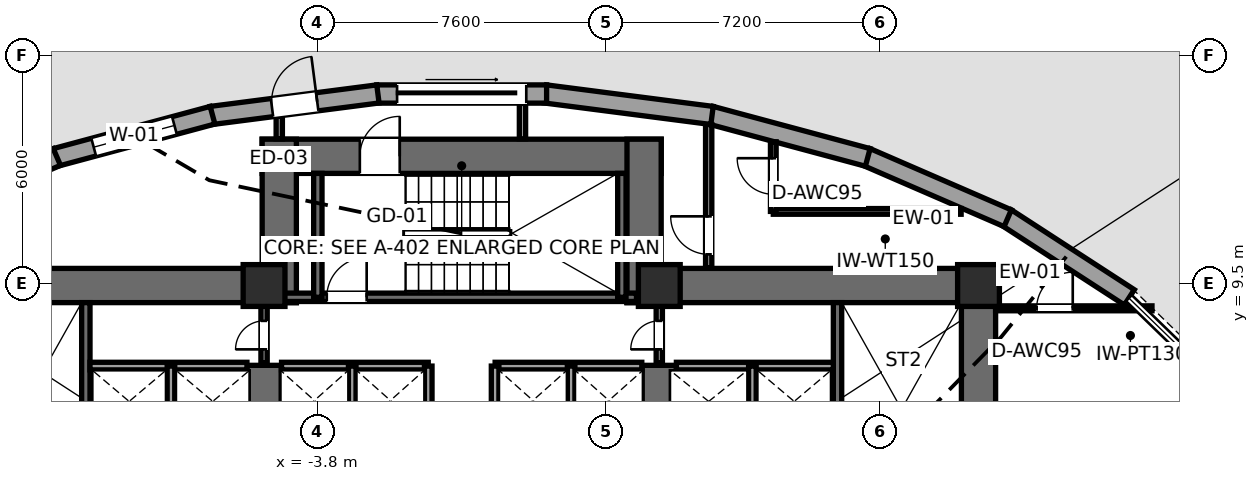
"""IFC4 building model, lengths in metres.
Left out: names, types, materials, properties, quantities, classifications, styles, units other than length and angle.
Written with IfcOpenShell. Run it as: python <this file> out.ifc"""

import sys

from ifc_helpers import new_model, si_unit, direction, frame, frame_2d, origin, origin_2d, place, context, subcontext, project, spatial, rectangle, extrude, element, fill, save


model = new_model("IFC4")
c1 = context("Model", 3, precision=1e-05, world=origin(), true_north=direction((0.0, 1.0)))
c2 = subcontext(c1, "Body", "Model", "MODEL_VIEW")
j1 = project(units=[si_unit("LENGTHUNIT", "METRE"), si_unit("PLANEANGLEUNIT", "RADIAN")], contexts=[c1])
p1 = place(None, origin())
s1 = spatial("IfcSite", under=j1, at=p1, CompositionType="ELEMENT")
p2 = place(p1, origin())
s2 = spatial("IfcBuilding", under=s1, at=p2, CompositionType="ELEMENT")
p3 = place(p2, origin())
s3 = spatial("IfcBuildingStorey", under=s2, at=p3, CompositionType="ELEMENT", Elevation=0.0)
p4 = place(p3, frame((-14.05, 9.45, 0.0), z_axis=(0.0, 0.0, 1.0), x_axis=(1.0, 0.0, 0.0)))
e1 = element("IfcWall", 1, at=p4, inside=s3, PredefinedType="SHEAR", context=c2, shape_type="SweptSolid", body=[
    extrude(rectangle(XDim=9.7, YDim=0.9, at=frame_2d((4.85, 0.0))), origin(), (0.0, 0.0, 1.0), 6.0),
])
p5 = place(p3, frame((-5.2, 5.35, 0.0), z_axis=(0.0, 0.0, 1.0), x_axis=(0.0, 1.0, 0.0)))
e2 = element("IfcWall", 2, at=p5, inside=s3, PredefinedType="SHEAR", context=c2, shape_type="SweptSolid", body=[
    extrude(rectangle(XDim=2.0, YDim=0.9, at=frame_2d((1.0, 0.0))), origin(), (0.0, 0.0, 1.0), 6.0),
])
p6 = place(p3, frame((-9.89, 1.85, 0.0), z_axis=(0.0, 0.0, 1.0), x_axis=(0.0, 1.0, 0.0)))
e3 = element("IfcWall", 3, at=p6, inside=s3, PredefinedType="SHEAR", context=c2, shape_type="SweptSolid", body=[
    extrude(rectangle(XDim=7.15, YDim=0.22, at=frame_2d((3.575, 0.0))), origin(), (0.0, 0.0, 1.0), 6.0),
])
p7 = place(p3, frame((13.6, 0.95, 0.0), z_axis=(0.0, 0.0, 1.0), x_axis=(0.0, 1.0, 0.0)))
e4 = element("IfcWall", 4, at=p7, inside=s3, PredefinedType="SHEAR", context=c2, shape_type="SweptSolid", body=[
    extrude(rectangle(XDim=8.95, YDim=0.9, at=frame_2d((4.475, 0.0))), origin(), (0.0, 0.0, 1.0), 6.0),
])
p8 = place(p7, frame((1.27, 0.0, 0.0)))
e5 = element("IfcOpeningElement", 5, at=p8, cuts=e4, PredefinedType="OPENING", context=c2, shape_type="SweptSolid", body=[
    extrude(rectangle(XDim=1.05, YDim=2.15, at=frame_2d((0.525, 1.075))), frame((0.0, 0.46, 0.0), z_axis=(0.0, -1.0, 0.0), x_axis=(1.0, 0.0, 0.0)), (0.0, 0.0, 1.0), 0.92),
])
p9 = place(p3, frame((4.35, 9.45, 0.0), z_axis=(0.0, 0.0, 1.0), x_axis=(1.0, 0.0, 0.0)))
e6 = element("IfcWall", 6, at=p9, inside=s3, PredefinedType="SHEAR", context=c2, shape_type="SweptSolid", body=[
    extrude(rectangle(XDim=9.7, YDim=0.9, at=frame_2d((4.85, 0.0))), origin(), (0.0, 0.0, 1.0), 6.0),
])
p10 = place(p3, frame((5.2, 5.35, 0.0), z_axis=(0.0, 0.0, 1.0), x_axis=(0.0, 1.0, 0.0)))
e7 = element("IfcWall", 7, at=p10, inside=s3, PredefinedType="SHEAR", context=c2, shape_type="SweptSolid", body=[
    extrude(rectangle(XDim=2.0, YDim=0.9, at=frame_2d((1.0, 0.0))), origin(), (0.0, 0.0, 1.0), 6.0),
])
p11 = place(p3, frame((9.89, 1.85, 0.0), z_axis=(0.0, 0.0, 1.0), x_axis=(0.0, 1.0, 0.0)))
e8 = element("IfcWall", 8, at=p11, inside=s3, PredefinedType="SHEAR", context=c2, shape_type="SweptSolid", body=[
    extrude(rectangle(XDim=7.15, YDim=0.22, at=frame_2d((3.575, 0.0))), origin(), (0.0, 0.0, 1.0), 6.0),
])
p12 = place(p3, frame((-5.25, 12.85, 0.0), z_axis=(0.0, 0.0, 1.0), x_axis=(1.0, 0.0, 0.0)))
e9 = element("IfcWall", 9, at=p12, inside=s3, PredefinedType="SHEAR", context=c2, shape_type="SweptSolid", body=[
    extrude(rectangle(XDim=10.5, YDim=0.9, at=frame_2d((5.25, 0.0))), origin(), (0.0, 0.0, 1.0), 6.0),
])
p13 = place(p12, frame((2.57, 0.0, 0.0)))
e10 = element("IfcOpeningElement", 10, at=p13, cuts=e9, PredefinedType="OPENING", context=c2, shape_type="SweptSolid", body=[
    extrude(rectangle(XDim=1.05, YDim=2.15, at=frame_2d((0.525, 1.075))), frame((0.0, 0.46, 0.0), z_axis=(0.0, -1.0, 0.0), x_axis=(1.0, 0.0, 0.0)), (0.0, 0.0, 1.0), 0.92),
])
for number, where, z_axis, x_axis in (
    (11, (-4.8, 9.0, 0.0), (0.0, 0.0, 1.0), (0.0, 1.0, 0.0)),
    (12, (4.8, 9.0, 0.0), (0.0, 0.0, 1.0), (0.0, 1.0, 0.0)),
):
    element("IfcWall", number, at=place(p3, frame(where, z_axis=z_axis, x_axis=x_axis)), inside=s3, PredefinedType="SHEAR", context=c2, shape_type="SweptSolid", body=[
        extrude(rectangle(XDim=4.3, YDim=0.9, at=frame_2d((2.15, 0.0))), origin(), (0.0, 0.0, 1.0), 6.0),
    ])
p14 = place(p3, frame((-4.7, 9.14, 0.0), z_axis=(0.0, 0.0, 1.0), x_axis=(1.0, 0.0, 0.0)))
e13 = element("IfcWall", 13, at=p14, inside=s3, PredefinedType="SHEAR", context=c2, shape_type="SweptSolid", body=[
    extrude(rectangle(XDim=9.3, YDim=0.22, at=frame_2d((4.65, 0.0))), origin(), (0.0, 0.0, 1.0), 6.0),
])
p15 = place(p14, frame((1.15, 0.0, 0.0)))
e14 = element("IfcOpeningElement", 14, at=p15, cuts=e13, PredefinedType="OPENING", context=c2, shape_type="SweptSolid", body=[
    extrude(rectangle(XDim=1.05, YDim=2.15, at=frame_2d((0.525, 1.075))), frame((0.0, 0.12, 0.0), z_axis=(0.0, -1.0, 0.0), x_axis=(1.0, 0.0, 0.0)), (0.0, 0.0, 1.0), 0.24),
])
for number, where, z_axis, x_axis in (
    (15, (-3.785, 9.14, 0.0), (0.0, 0.0, 1.0), (0.0, 1.0, 0.0)),
    (16, (4.215, 9.14, 0.0), (0.0, 0.0, 1.0), (0.0, 1.0, 0.0)),
):
    element("IfcWall", number, at=place(p3, frame(where, z_axis=z_axis, x_axis=x_axis)), inside=s3, PredefinedType="SHEAR", context=c2, shape_type="SweptSolid", body=[
        extrude(rectangle(XDim=3.26, YDim=0.22, at=frame_2d((1.63, 0.0))), origin(), (0.0, 0.0, 1.0), 6.0),
    ])
for number, where, z_axis, x_axis in (
    (17, (-5.2, 9.45, 0.0), (0.0, 0.0, 1.0), (1.0, 0.0, 0.0)),
    (18, (5.2, 9.45, 0.0), (0.0, 0.0, 1.0), (1.0, 0.0, 0.0)),
    (19, (13.6, 9.45, 0.0), (0.0, 0.0, 1.0), (1.0, 0.0, 0.0)),
):
    element("IfcColumn", number, at=place(p3, frame(where, z_axis=z_axis, x_axis=x_axis)), inside=s3, PredefinedType="COLUMN", context=c2, shape_type="SweptSolid", body=[
        extrude(rectangle(XDim=1.1, YDim=1.1, at=origin_2d()), origin(), (0.0, 0.0, 1.0), 6.0),
    ])
p16 = place(p3, frame((14.333, 11.239, 0.0), z_axis=(0.0, 0.0, 1.0), x_axis=(0.838764450243, -0.54449444167, 0.0)))
e20 = element("IfcWall", 20, at=p16, inside=s3, PredefinedType="STANDARD", context=c2, shape_type="SweptSolid", body=[
    extrude(rectangle(XDim=3.858, YDim=0.48, at=frame_2d((1.929, 0.0))), origin(), (0.0, 0.0, 1.0), 4.913),
])
p17 = place(p3, frame((10.652, 12.832, 0.0), z_axis=(0.0, 0.0, 1.0), x_axis=(0.917428047281, -0.3979017191, 0.0)))
e21 = element("IfcWall", 21, at=p17, inside=s3, PredefinedType="STANDARD", context=c2, shape_type="SweptSolid", body=[
    extrude(rectangle(XDim=4.051, YDim=0.48, at=frame_2d((2.025, 0.0))), origin(), (0.0, 0.0, 1.0), 4.913),
])
p18 = place(p3, frame((6.556, 13.931, 0.0), z_axis=(0.0, 0.0, 1.0), x_axis=(0.965698398437, -0.259666330619, 0.0)))
e22 = element("IfcWall", 22, at=p18, inside=s3, PredefinedType="STANDARD", context=c2, shape_type="SweptSolid", body=[
    extrude(rectangle(XDim=4.276, YDim=0.48, at=frame_2d((2.138, 0.0))), origin(), (0.0, 0.0, 1.0), 4.913),
])
p19 = place(p3, frame((2.204, 14.491, 0.0), z_axis=(0.0, 0.0, 1.0), x_axis=(0.99177017627, -0.128030923847, 0.0)))
e23 = element("IfcWall", 23, at=p19, inside=s3, PredefinedType="STANDARD", context=c2, shape_type="SweptSolid", body=[
    extrude(rectangle(XDim=4.42, YDim=0.48, at=frame_2d((2.21, 0.0))), origin(), (0.0, 0.0, 1.0), 4.913),
])
p20 = place(p3, frame((-2.235, 14.489, 0.0), z_axis=(0.0, 0.0, 1.0), x_axis=(1.0, 0.0, 0.0)))
e24 = element("IfcWall", 24, at=p20, inside=s3, PredefinedType="STANDARD", context=c2, shape_type="SweptSolid", body=[
    extrude(rectangle(XDim=4.47, YDim=0.48, at=frame_2d((2.235, 0.0))), origin(), (0.0, 0.0, 1.0), 4.913),
])
p21 = place(p20, frame((0.535, 0.0, 0.0)))
e25 = element("IfcOpeningElement", 25, at=p21, cuts=e24, PredefinedType="OPENING", context=c2, shape_type="SweptSolid", body=[
    extrude(rectangle(XDim=3.4, YDim=3.6, at=frame_2d((1.7, 1.8))), frame((0.0, 0.25, 0.0), z_axis=(0.0, -1.0, 0.0), x_axis=(1.0, 0.0, 0.0)), (0.0, 0.0, 1.0), 0.5),
])
p22 = place(p3, frame((-6.588, 13.925, 0.0), z_axis=(0.0, 0.0, 1.0), x_axis=(0.99177017627, 0.128030923847, 0.0)))
e26 = element("IfcWall", 26, at=p22, inside=s3, PredefinedType="STANDARD", context=c2, shape_type="SweptSolid", body=[
    extrude(rectangle(XDim=4.42, YDim=0.48, at=frame_2d((2.21, 0.0))), origin(), (0.0, 0.0, 1.0), 4.913),
])
p23 = place(p22, frame((1.61, 0.0, 0.0)))
e27 = element("IfcOpeningElement", 27, at=p23, cuts=e26, PredefinedType="OPENING", context=c2, shape_type="SweptSolid", body=[
    extrude(rectangle(XDim=1.2, YDim=2.2, at=frame_2d((0.6, 1.1))), frame((0.0, 0.25, 0.0), z_axis=(0.0, -1.0, 0.0), x_axis=(1.0, 0.0, 0.0)), (0.0, 0.0, 1.0), 0.5),
])
p24 = place(p3, frame((-10.686, 12.821, 0.0), z_axis=(0.0, 0.0, 1.0), x_axis=(0.965698398437, 0.259666330619, 0.0)))
e28 = element("IfcWall", 28, at=p24, inside=s3, PredefinedType="STANDARD", context=c2, shape_type="SweptSolid", body=[
    extrude(rectangle(XDim=4.276, YDim=0.48, at=frame_2d((2.138, 0.0))), origin(), (0.0, 0.0, 1.0), 4.913),
])
p25 = place(p24, frame((1.038, 0.0, 0.85)))
e29 = element("IfcOpeningElement", 29, at=p25, cuts=e28, PredefinedType="OPENING", context=c2, shape_type="SweptSolid", body=[
    extrude(rectangle(XDim=2.2, YDim=1.95, at=frame_2d((1.1, 0.975))), frame((0.0, 0.25, 0.0), z_axis=(0.0, -1.0, 0.0), x_axis=(1.0, 0.0, 0.0)), (0.0, 0.0, 1.0), 0.5),
])
p26 = place(p3, frame((-14.369, 11.22, 0.0), z_axis=(0.0, 0.0, 1.0), x_axis=(0.917428047281, 0.3979017191, 0.0)))
e30 = element("IfcWall", 30, at=p26, inside=s3, PredefinedType="STANDARD", context=c2, shape_type="SweptSolid", body=[
    extrude(rectangle(XDim=4.051, YDim=0.48, at=frame_2d((2.025, 0.0))), origin(), (0.0, 0.0, 1.0), 4.913),
])
p27 = place(p26, frame((0.925, 0.0, 0.85)))
e31 = element("IfcOpeningElement", 31, at=p27, cuts=e30, PredefinedType="OPENING", context=c2, shape_type="SweptSolid", body=[
    extrude(rectangle(XDim=2.2, YDim=1.95, at=frame_2d((1.1, 0.975))), frame((0.0, 0.25, 0.0), z_axis=(0.0, -1.0, 0.0), x_axis=(1.0, 0.0, 0.0)), (0.0, 0.0, 1.0), 0.5),
])
p28 = place(p3, frame((-9.78, 7.33, 0.0), z_axis=(0.0, 0.0, 1.0), x_axis=(1.0, 0.0, 0.0)))
e32 = element("IfcWall", 32, at=p28, inside=s3, PredefinedType="SOLIDWALL", context=c2, shape_type="SweptSolid", body=[
    extrude(rectangle(XDim=4.13, YDim=0.2, at=frame_2d((2.065, 0.0))), origin(), (0.0, 0.0, 1.0), 5.78),
])
p29 = place(p3, frame((-7.65, 5.47, 0.0), z_axis=(0.0, 0.0, 1.0), x_axis=(0.0, 1.0, 0.0)))
e33 = element("IfcWall", 33, at=p29, inside=s3, PredefinedType="SOLIDWALL", context=c2, shape_type="SweptSolid", body=[
    extrude(rectangle(XDim=1.86, YDim=0.2, at=frame_2d((0.93, 0.0))), origin(), (0.0, 0.0, 1.0), 5.78),
])
p30 = place(p3, frame((5.65, 7.33, 0.0), z_axis=(0.0, 0.0, 1.0), x_axis=(1.0, 0.0, 0.0)))
e34 = element("IfcWall", 34, at=p30, inside=s3, PredefinedType="SOLIDWALL", context=c2, shape_type="SweptSolid", body=[
    extrude(rectangle(XDim=4.13, YDim=0.2, at=frame_2d((2.065, 0.0))), origin(), (0.0, 0.0, 1.0), 5.78),
])
p31 = place(p3, frame((7.65, 5.47, 0.0), z_axis=(0.0, 0.0, 1.0), x_axis=(0.0, 1.0, 0.0)))
e35 = element("IfcWall", 35, at=p31, inside=s3, PredefinedType="SOLIDWALL", context=c2, shape_type="SweptSolid", body=[
    extrude(rectangle(XDim=1.86, YDim=0.2, at=frame_2d((0.93, 0.0))), origin(), (0.0, 0.0, 1.0), 5.78),
])
for number, where, z_axis, x_axis in (
    (36, (-4.74, 7.33, 0.0), (0.0, 0.0, 1.0), (1.0, 0.0, 0.0)),
    (37, (0.88, 7.33, 0.0), (0.0, 0.0, 1.0), (1.0, 0.0, 0.0)),
):
    element("IfcWall", number, at=place(p3, frame(where, z_axis=z_axis, x_axis=x_axis)), inside=s3, PredefinedType="SOLIDWALL", context=c2, shape_type="SweptSolid", body=[
        extrude(rectangle(XDim=3.86, YDim=0.2, at=frame_2d((1.93, 0.0))), origin(), (0.0, 0.0, 1.0), 5.78),
    ])
for number, where, z_axis, x_axis in (
    (38, (-2.88, 5.52, 0.0), (0.0, 0.0, 1.0), (0.0, 1.0, 0.0)),
    (39, (2.88, 5.52, 0.0), (0.0, 0.0, 1.0), (0.0, 1.0, 0.0)),
    (40, (-0.88, 5.52, 0.0), (0.0, 0.0, 1.0), (0.0, 1.0, 0.0)),
    (41, (0.88, 5.52, 0.0), (0.0, 0.0, 1.0), (0.0, 1.0, 0.0)),
):
    element("IfcWall", number, at=place(p3, frame(where, z_axis=z_axis, x_axis=x_axis)), inside=s3, PredefinedType="SOLIDWALL", context=c2, shape_type="SweptSolid", body=[
        extrude(rectangle(XDim=1.81, YDim=0.2, at=frame_2d((0.905, 0.0))), origin(), (0.0, 0.0, 1.0), 5.78),
    ])
p32 = place(p3, frame((-5.2, 7.42, 0.0), z_axis=(0.0, 0.0, 1.0), x_axis=(0.0, 1.0, 0.0)))
e42 = element("IfcWall", 42, at=p32, inside=s3, PredefinedType="PARTITIONING", context=c2, shape_type="SweptSolid", body=[
    extrude(rectangle(XDim=1.58, YDim=0.165, at=frame_2d((0.79, 0.0))), origin(), (0.0, 0.0, 1.0), 5.78),
])
p33 = place(p32, frame((0.35, 0.0, 0.0)))
e43 = element("IfcOpeningElement", 43, at=p33, cuts=e42, PredefinedType="OPENING", context=c2, shape_type="SweptSolid", body=[
    extrude(rectangle(XDim=0.75, YDim=2.1, at=frame_2d((0.375, 1.05))), frame((0.0, 0.093, 0.0), z_axis=(0.0, -1.0, 0.0), x_axis=(1.0, 0.0, 0.0)), (0.0, 0.0, 1.0), 0.185),
])
p34 = place(p3, frame((5.2, 7.42, 0.0), z_axis=(0.0, 0.0, 1.0), x_axis=(0.0, 1.0, 0.0)))
e44 = element("IfcWall", 44, at=p34, inside=s3, PredefinedType="PARTITIONING", context=c2, shape_type="SweptSolid", body=[
    extrude(rectangle(XDim=1.58, YDim=0.165, at=frame_2d((0.79, 0.0))), origin(), (0.0, 0.0, 1.0), 5.78),
])
p35 = place(p34, frame((0.35, 0.0, 0.0)))
e45 = element("IfcOpeningElement", 45, at=p35, cuts=e44, PredefinedType="OPENING", context=c2, shape_type="SweptSolid", body=[
    extrude(rectangle(XDim=0.75, YDim=2.1, at=frame_2d((0.375, 1.05))), frame((0.0, 0.093, 0.0), z_axis=(0.0, -1.0, 0.0), x_axis=(1.0, 0.0, 0.0)), (0.0, 0.0, 1.0), 0.185),
])
p36 = place(p3, frame((-4.8, 13.31, 0.0), z_axis=(0.0, 0.0, 1.0), x_axis=(0.0, 1.0, 0.0)))
e46 = element("IfcWall", 46, at=p36, inside=s3, PredefinedType="PARTITIONING", context=c2, shape_type="SweptSolid", body=[
    extrude(rectangle(XDim=0.595, YDim=0.165, at=frame_2d((0.298, 0.0))), origin(), (0.0, 0.0, 1.0), 5.233),
])
p37 = place(p3, frame((1.6, 13.31, 0.0), z_axis=(0.0, 0.0, 1.0), x_axis=(0.0, 1.0, 0.0)))
e47 = element("IfcWall", 47, at=p37, inside=s3, PredefinedType="PARTITIONING", context=c2, shape_type="SweptSolid", body=[
    extrude(rectangle(XDim=0.931, YDim=0.165, at=frame_2d((0.465, 0.0))), origin(), (0.0, 0.0, 1.0), 5.78),
])
p38 = place(p3, frame((6.5, 9.92, 0.0), z_axis=(0.0, 0.0, 1.0), x_axis=(0.0, 1.0, 0.0)))
e48 = element("IfcWall", 48, at=p38, inside=s3, PredefinedType="PARTITIONING", context=c2, shape_type="SweptSolid", body=[
    extrude(rectangle(XDim=3.766, YDim=0.165, at=frame_2d((1.883, 0.0))), origin(), (0.0, 0.0, 1.0), 5.148),
])
p39 = place(p38, frame((0.35, 0.0, 0.0)))
e49 = element("IfcOpeningElement", 49, at=p39, cuts=e48, PredefinedType="OPENING", context=c2, shape_type="SweptSolid", body=[
    extrude(rectangle(XDim=1.0, YDim=2.15, at=frame_2d((0.5, 1.075))), frame((0.0, 0.093, 0.0), z_axis=(0.0, -1.0, 0.0), x_axis=(1.0, 0.0, 0.0)), (0.0, 0.0, 1.0), 0.185),
])
p40 = place(p3, frame((8.2, 11.4, 0.0), z_axis=(0.0, 0.0, 1.0), x_axis=(1.0, 0.0, 0.0)))
e50 = element("IfcWall", 50, at=p40, inside=s3, PredefinedType="PLUMBINGWALL", context=c2, shape_type="SweptSolid", body=[
    extrude(rectangle(XDim=4.943, YDim=0.15, at=frame_2d((2.471, 0.0))), origin(), (0.0, 0.0, 1.0), 5.78),
])
p41 = place(p3, frame((8.2, 11.4, 0.0), z_axis=(0.0, 0.0, 1.0), x_axis=(0.0, 1.0, 0.0)))
e51 = element("IfcWall", 51, at=p41, inside=s3, PredefinedType="PLUMBINGWALL", context=c2, shape_type="SweptSolid", body=[
    extrude(rectangle(XDim=1.832, YDim=0.15, at=frame_2d((0.916, 0.0))), origin(), (0.0, 0.0, 1.0), 5.78),
])
p42 = place(p41, frame((0.45, 0.0, 0.0)))
e52 = element("IfcOpeningElement", 52, at=p42, cuts=e51, PredefinedType="OPENING", context=c2, shape_type="SweptSolid", body=[
    extrude(rectangle(XDim=0.95, YDim=2.15, at=frame_2d((0.475, 1.075))), frame((0.0, 0.085, 0.0), z_axis=(0.0, -1.0, 0.0), x_axis=(1.0, 0.0, 0.0)), (0.0, 0.0, 1.0), 0.17),
])
p43 = place(p3, frame((14.05, 8.85, 0.0), z_axis=(0.0, 0.0, 1.0), x_axis=(1.0, 0.0, 0.0)))
e53 = element("IfcWall", 53, at=p43, inside=s3, PredefinedType="PARTITIONING", context=c2, shape_type="SweptSolid", body=[
    extrude(rectangle(XDim=4.115, YDim=0.13, at=frame_2d((2.058, 0.0))), origin(), (0.0, 0.0, 1.0), 5.78),
])
p44 = place(p43, frame((1.08, 0.0, 0.0)))
e54 = element("IfcOpeningElement", 54, at=p44, cuts=e53, PredefinedType="OPENING", context=c2, shape_type="SweptSolid", body=[
    extrude(rectangle(XDim=0.95, YDim=2.15, at=frame_2d((0.475, 1.075))), frame((0.0, 0.075, 0.0), z_axis=(0.0, -1.0, 0.0), x_axis=(1.0, 0.0, 0.0)), (0.0, 0.0, 1.0), 0.15),
])
p45 = place(p21, origin())
e55 = element("IfcDoor", 55, at=p45, inside=s3, OperationType="ROLLINGUP", PredefinedType="GATE", context=c2, shape_type="SweptSolid", body=[
    extrude(rectangle(XDim=3.4, YDim=3.6, at=frame_2d((1.7, 1.8))), frame((0.0, 0.025, 0.0), z_axis=(0.0, -1.0, 0.0), x_axis=(1.0, 0.0, 0.0)), (0.0, 0.0, 1.0), 0.05),
])
fill(e25, e55)
p46 = place(p23, origin())
e56 = element("IfcDoor", 56, at=p46, inside=s3, OperationType="SINGLE_SWING_RIGHT", PredefinedType="DOOR", context=c2, shape_type="SweptSolid", body=[
    extrude(rectangle(XDim=1.2, YDim=2.2, at=frame_2d((0.6, 1.1))), frame((0.0, 0.025, 0.0), z_axis=(0.0, -1.0, 0.0), x_axis=(1.0, 0.0, 0.0)), (0.0, 0.0, 1.0), 0.05),
])
fill(e27, e56)
p47 = place(p25, origin())
e57 = element("IfcWindow", 57, at=p47, inside=s3, PartitioningType="SINGLE_PANEL", PredefinedType="WINDOW", context=c2, shape_type="SweptSolid", body=[
    extrude(rectangle(XDim=2.2, YDim=1.95, at=frame_2d((1.1, 0.975))), frame((0.0, -0.01, 0.0), z_axis=(0.0, -1.0, 0.0), x_axis=(1.0, 0.0, 0.0)), (0.0, 0.0, 1.0), 0.06),
])
fill(e29, e57)
p48 = place(p15, origin())
e58 = element("IfcDoor", 58, at=p48, inside=s3, OperationType="SINGLE_SWING_RIGHT", PredefinedType="DOOR", context=c2, shape_type="SweptSolid", body=[
    extrude(rectangle(XDim=1.05, YDim=2.15, at=frame_2d((0.525, 1.075))), frame((0.0, 0.025, 0.0), z_axis=(0.0, -1.0, 0.0), x_axis=(1.0, 0.0, 0.0)), (0.0, 0.0, 1.0), 0.05),
])
fill(e14, e58)
p49 = place(p13, origin())
e59 = element("IfcDoor", 59, at=p49, inside=s3, OperationType="SINGLE_SWING_RIGHT", PredefinedType="DOOR", context=c2, shape_type="SweptSolid", body=[
    extrude(rectangle(XDim=1.05, YDim=2.15, at=frame_2d((0.525, 1.075))), frame((0.0, 0.025, 0.0), z_axis=(0.0, -1.0, 0.0), x_axis=(1.0, 0.0, 0.0)), (0.0, 0.0, 1.0), 0.05),
])
fill(e10, e59)
p50 = place(p33, origin())
e60 = element("IfcDoor", 60, at=p50, inside=s3, OperationType="SINGLE_SWING_LEFT", PredefinedType="DOOR", context=c2, shape_type="SweptSolid", body=[
    extrude(rectangle(XDim=0.75, YDim=2.1, at=frame_2d((0.375, 1.05))), frame((0.0, 0.025, 0.0), z_axis=(0.0, -1.0, 0.0), x_axis=(1.0, 0.0, 0.0)), (0.0, 0.0, 1.0), 0.05),
])
fill(e43, e60)
p51 = place(p35, origin())
e61 = element("IfcDoor", 61, at=p51, inside=s3, OperationType="SINGLE_SWING_LEFT", PredefinedType="DOOR", context=c2, shape_type="SweptSolid", body=[
    extrude(rectangle(XDim=0.75, YDim=2.1, at=frame_2d((0.375, 1.05))), frame((0.0, 0.025, 0.0), z_axis=(0.0, -1.0, 0.0), x_axis=(1.0, 0.0, 0.0)), (0.0, 0.0, 1.0), 0.05),
])
fill(e45, e61)
p52 = place(p39, origin())
e62 = element("IfcDoor", 62, at=p52, inside=s3, OperationType="SINGLE_SWING_RIGHT", PredefinedType="DOOR", context=c2, shape_type="SweptSolid", body=[
    extrude(rectangle(XDim=1.0, YDim=2.15, at=frame_2d((0.5, 1.075))), frame((0.0, 0.025, 0.0), z_axis=(0.0, -1.0, 0.0), x_axis=(1.0, 0.0, 0.0)), (0.0, 0.0, 1.0), 0.05),
])
fill(e49, e62)
p53 = place(p42, origin())
e63 = element("IfcDoor", 63, at=p53, inside=s3, OperationType="SINGLE_SWING_RIGHT", PredefinedType="DOOR", context=c2, shape_type="SweptSolid", body=[
    extrude(rectangle(XDim=0.95, YDim=2.15, at=frame_2d((0.475, 1.075))), frame((0.0, 0.025, 0.0), z_axis=(0.0, -1.0, 0.0), x_axis=(1.0, 0.0, 0.0)), (0.0, 0.0, 1.0), 0.05),
])
fill(e52, e63)
p54 = place(p44, origin())
e64 = element("IfcDoor", 64, at=p54, inside=s3, OperationType="SINGLE_SWING_RIGHT", PredefinedType="DOOR", context=c2, shape_type="SweptSolid", body=[
    extrude(rectangle(XDim=0.95, YDim=2.15, at=frame_2d((0.475, 1.075))), frame((0.0, 0.025, 0.0), z_axis=(0.0, -1.0, 0.0), x_axis=(1.0, 0.0, 0.0)), (0.0, 0.0, 1.0), 0.05),
])
fill(e54, e64)
save(model, sys.argv[1])
